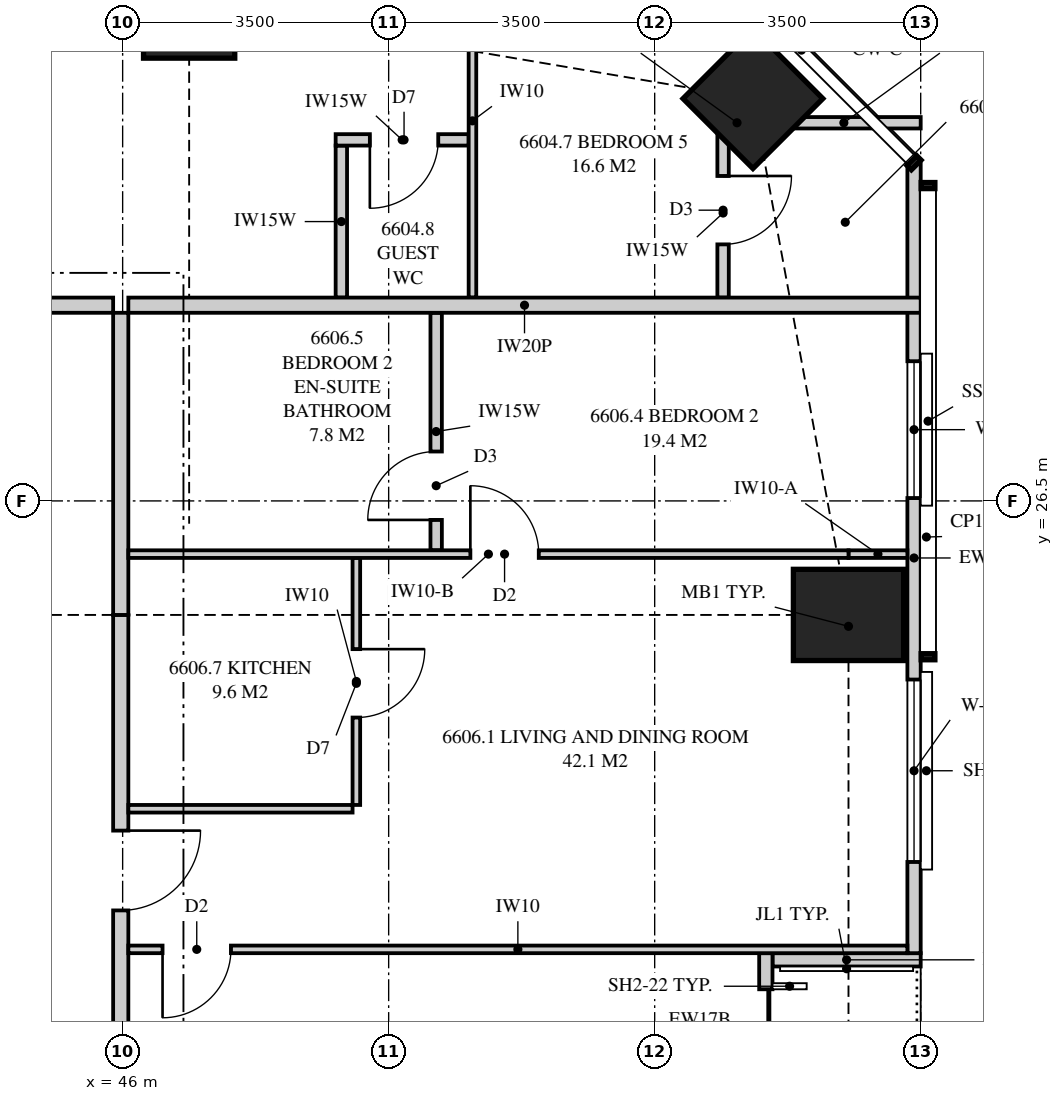
"""IFC4 building model, lengths in metres.
Left out: names, types, materials, properties, quantities, classifications, styles, units other than length and angle.
Written with IfcOpenShell. Run it as: python <this file> out.ifc"""

import sys

from ifc_helpers import new_model, si_unit, direction, frame, frame_2d, origin, origin_2d, place, context, subcontext, project, spatial, polyline, rectangle, outline, extrude, element, fill, save


model = new_model("IFC4")
c1 = context("Model", 3, precision=1e-05, world=origin(), true_north=direction((0.0, 1.0)))
c2 = subcontext(c1, "Body", "Model", "MODEL_VIEW")
j1 = project(units=[si_unit("LENGTHUNIT", "METRE"), si_unit("PLANEANGLEUNIT", "RADIAN")], contexts=[c1])
p1 = place(None, origin())
s1 = spatial("IfcSite", under=j1, at=p1, CompositionType="ELEMENT")
p2 = place(p1, origin())
s2 = spatial("IfcBuilding", under=s1, at=p2, CompositionType="ELEMENT")
p3 = place(p2, frame((0.0, 0.0, 242.45)))
s3 = spatial("IfcBuildingStorey", under=s2, at=p3, CompositionType="ELEMENT", Elevation=242.45)
p4 = place(p3, frame((55.55, 25.0, 0.0), z_axis=(0.0, 0.0, 1.0), x_axis=(1.0, 0.0, 0.0)))
e1 = element("IfcColumn", 1, at=p4, inside=s3, PredefinedType="COLUMN", context=c2, shape_type="SweptSolid", body=[
    extrude(rectangle(XDim=1.45, YDim=1.2, at=origin_2d()), origin(), (0.0, 0.0, 1.0), 3.5),
])
p5 = place(p3, frame((54.293, 31.793, 0.0), z_axis=(0.0, 0.0, 1.0), x_axis=(0.707106781187, 0.707106781187, 0.0)))
e2 = element("IfcColumn", 2, at=p5, inside=s3, PredefinedType="COLUMN", context=c2, shape_type="SweptSolid", body=[
    extrude(rectangle(XDim=1.3, YDim=1.3, at=origin_2d()), origin(), (0.0, 0.0, 1.0), 3.5),
])
p6 = place(p3, frame((46.875, 33.05, 0.0), z_axis=(0.0, 0.0, 1.0), x_axis=(0.0, 1.0, 0.0)))
e3 = element("IfcColumn", 3, at=p6, inside=s3, PredefinedType="COLUMN", context=c2, shape_type="SweptSolid", body=[
    extrude(rectangle(XDim=1.45, YDim=1.2, at=origin_2d()), origin(), (0.0, 0.0, 1.0), 3.5),
])
p7 = place(p3, frame((56.413, 20.55, 0.0), z_axis=(0.0, 0.0, 1.0), x_axis=(0.0, 1.0, 0.0)))
e4 = element("IfcWall", 4, at=p7, inside=s3, PredefinedType="SOLIDWALL", context=c2, shape_type="SweptSolid", body=[
    extrude(outline(polyline([(0.0, 0.0), (10.399, 0.0), (10.399, 3.26), (4.658, 3.26), (4.658, 2.3), (4.594, 2.3), (4.594, 3.26), (4.45, 3.26), (4.45, 2.3), (0.0, 2.3), (0.0, 0.0)])), frame((0.0, 0.087, 0.0), z_axis=(0.0, -1.0, 0.0), x_axis=(1.0, 0.0, 0.0)), (0.0, 0.0, 1.0), 0.175),
])
p8 = place(p7, frame((1.2, 0.0, 0.4)))
e5 = element("IfcOpeningElement", 5, at=p8, cuts=e4, PredefinedType="OPENING", context=c2, shape_type="SweptSolid", body=[
    extrude(rectangle(XDim=2.4, YDim=1.85, at=frame_2d((1.2, 0.925))), frame((0.0, 0.097, 0.0), z_axis=(0.0, -1.0, 0.0), x_axis=(1.0, 0.0, 0.0)), (0.0, 0.0, 1.0), 0.195),
])
p9 = place(p7, frame((5.988, 0.0, 0.4)))
e6 = element("IfcOpeningElement", 6, at=p9, cuts=e4, PredefinedType="OPENING", context=c2, shape_type="SweptSolid", body=[
    extrude(rectangle(XDim=1.8, YDim=1.85, at=frame_2d((0.9, 0.925))), frame((0.0, 0.097, 0.0), z_axis=(0.0, -1.0, 0.0), x_axis=(1.0, 0.0, 0.0)), (0.0, 0.0, 1.0), 0.195),
])
p10 = place(p3, frame((54.462, 17.8, 0.0), z_axis=(0.0, 0.0, 1.0), x_axis=(0.0, 1.0, 0.0)))
e7 = element("IfcWall", 7, at=p10, inside=s3, PredefinedType="SOLIDWALL", context=c2, shape_type="SweptSolid", body=[
    extrude(outline(polyline([(0.0, 0.0), (2.75, 0.0), (2.75, 3.26), (2.15, 3.26), (2.15, 2.66), (0.0, 2.66), (0.0, 0.0)])), frame((0.0, 0.087, 0.0), z_axis=(0.0, -1.0, 0.0), x_axis=(1.0, 0.0, 0.0)), (0.0, 0.0, 1.0), 0.175),
])
p11 = place(p10, frame((0.475, 0.0, 0.0)))
e8 = element("IfcOpeningElement", 8, at=p11, cuts=e7, PredefinedType="OPENING", context=c2, shape_type="SweptSolid", body=[
    extrude(rectangle(XDim=1.8, YDim=2.25, at=frame_2d((0.9, 1.125))), frame((0.0, 0.097, 0.0), z_axis=(0.0, -1.0, 0.0), x_axis=(1.0, 0.0, 0.0)), (0.0, 0.0, 1.0), 0.195),
])
p12 = place(p3, frame((56.5, 20.462, 0.0), z_axis=(0.0, 0.0, 1.0), x_axis=(-1.0, 0.0, 0.0)))
e9 = element("IfcWall", 9, at=p12, inside=s3, PredefinedType="SOLIDWALL", context=c2, shape_type="SweptSolid", body=[
    extrude(outline(polyline([(0.0, 0.0), (1.95, 0.0), (1.95, 3.26), (1.75, 3.26), (1.75, 2.3), (0.15, 2.3), (0.15, 3.26), (0.0, 3.26), (0.0, 0.0)])), frame((0.0, 0.087, 0.0), z_axis=(0.0, -1.0, 0.0), x_axis=(1.0, 0.0, 0.0)), (0.0, 0.0, 1.0), 0.175),
])
p13 = place(p3, frame((18.0, 29.075, 0.0), z_axis=(0.0, 0.0, 1.0), x_axis=(1.0, 0.0, 0.0)))
e10 = element("IfcWall", 10, at=p13, inside=s3, PredefinedType="PARTITIONING", context=c2, shape_type="SweptSolid", body=[
    extrude(outline(polyline([(0.0, 0.0), (27.875, 0.0), (27.875, 3.26), (27.875, 2.66), (27.565, 2.66), (27.565, 3.26), (20.56, 3.26), (20.56, 2.66), (17.94, 2.66), (17.94, 3.26), (10.935, 3.26), (10.935, 2.66), (8.315, 2.66), (8.315, 3.26), (2.192, 3.26), (2.192, 2.3), (0.256, 2.3), (0.256, 3.26), (0.0, 3.26), (0.0, 0.0)])), frame((0.0, 0.1, 0.0), z_axis=(0.0, -1.0, 0.0), x_axis=(1.0, 0.0, 0.0)), (0.0, 0.0, 1.0), 0.2),
])
p14 = place(p13, frame((18.75, 0.0, 0.0)))
e11 = element("IfcOpeningElement", 11, at=p14, cuts=e10, PredefinedType="OPENING", context=c2, shape_type="SweptSolid", body=[
    extrude(rectangle(XDim=1.05, YDim=2.2, at=frame_2d((0.525, 1.1))), frame((0.0, 0.11, 0.0), z_axis=(0.0, -1.0, 0.0), x_axis=(1.0, 0.0, 0.0)), (0.0, 0.0, 1.0), 0.22),
])
p15 = place(p3, frame((53.975, 31.475, 0.0), z_axis=(0.0, 0.0, 1.0), x_axis=(1.0, 0.0, 0.0)))
e12 = element("IfcWall", 12, at=p15, inside=s3, PredefinedType="PLUMBINGWALL", context=c2, shape_type="SweptSolid", body=[
    extrude(rectangle(XDim=0.217, YDim=0.15, at=frame_2d((0.108, 0.0))), origin(), (0.0, 0.0, 1.0), 2.3),
])
p16 = place(p3, frame((54.478, 31.475, 0.0), z_axis=(0.0, 0.0, 1.0), x_axis=(1.0, 0.0, 0.0)))
e13 = element("IfcWall", 13, at=p16, inside=s3, PredefinedType="PLUMBINGWALL", context=c2, shape_type="SweptSolid", body=[
    extrude(outline(polyline([(0.774, 3.26), (0.774, 2.3), (0.325, 2.3), (0.0, 1.15), (0.325, 0.0), (2.022, 0.0), (2.022, 3.26), (0.774, 3.26)])), frame((0.0, 0.075, 0.0), z_axis=(0.0, -1.0, 0.0), x_axis=(1.0, 0.0, 0.0)), (0.0, 0.0, 1.0), 0.15),
])
p17 = place(p3, frame((53.9, 31.4, 0.0), z_axis=(0.0, 0.0, 1.0), x_axis=(0.0, -1.0, 0.0)))
e14 = element("IfcWall", 14, at=p17, inside=s3, PredefinedType="PLUMBINGWALL", context=c2, shape_type="SweptSolid", body=[
    extrude(outline(polyline([(0.0, 0.0), (2.225, 0.0), (2.225, 3.26), (2.225, 2.3), (0.438, 2.3), (0.0, 2.3), (0.0, 3.26), (0.0, 0.0)])), frame((0.0, 0.075, 0.0), z_axis=(0.0, -1.0, 0.0), x_axis=(1.0, 0.0, 0.0)), (0.0, 0.0, 1.0), 0.15),
])
p18 = place(p17, frame((0.625, 0.0, 0.0)))
e15 = element("IfcOpeningElement", 15, at=p18, cuts=e14, PredefinedType="OPENING", context=c2, shape_type="SweptSolid", body=[
    extrude(rectangle(XDim=0.9, YDim=2.1, at=frame_2d((0.45, 1.05))), frame((0.0, 0.085, 0.0), z_axis=(0.0, -1.0, 0.0), x_axis=(1.0, 0.0, 0.0)), (0.0, 0.0, 1.0), 0.17),
])
p19 = place(p3, frame((50.603, 33.825, 0.0), z_axis=(0.0, 0.0, 1.0), x_axis=(0.0, -1.0, 0.0)))
e16 = element("IfcWall", 16, at=p19, inside=s3, PredefinedType="PARTITIONING", context=c2, shape_type="SweptSolid", body=[
    extrude(outline(polyline([(0.0, 0.0), (4.65, 0.0), (4.65, 3.26), (2.279, 3.26), (2.279, 2.3), (0.534, 2.3), (0.534, 3.26), (0.0, 3.26), (0.0, 0.0)])), frame((0.0, 0.05, 0.0), z_axis=(0.0, -1.0, 0.0), x_axis=(1.0, 0.0, 0.0)), (0.0, 0.0, 1.0), 0.1),
])
p20 = place(p19, frame((0.15, 0.0, 0.0)))
e17 = element("IfcOpeningElement", 17, at=p20, cuts=e16, PredefinedType="OPENING", context=c2, shape_type="SweptSolid", body=[
    extrude(rectangle(XDim=0.9, YDim=2.1, at=frame_2d((0.45, 1.05))), frame((0.0, 0.06, 0.0), z_axis=(0.0, -1.0, 0.0), x_axis=(1.0, 0.0, 0.0)), (0.0, 0.0, 1.0), 0.12),
])
p21 = place(p3, frame((46.075, 29.075, 0.0), z_axis=(0.0, 0.0, 1.0), x_axis=(1.0, 0.0, 0.0)))
e18 = element("IfcWall", 18, at=p21, inside=s3, PredefinedType="PARTITIONING", context=c2, shape_type="SweptSolid", body=[
    extrude(outline(polyline([(0.0, 0.0), (10.425, 0.0), (10.425, 3.26), (9.646, 3.26), (9.646, 2.3), (7.795, 2.3), (7.795, 3.26), (2.11, 3.26), (2.11, 2.66), (0.0, 2.66), (0.0, 3.26), (0.0, 0.0)])), frame((0.0, 0.1, 0.0), z_axis=(0.0, -1.0, 0.0), x_axis=(1.0, 0.0, 0.0)), (0.0, 0.0, 1.0), 0.2),
])
p22 = place(p3, frame((45.975, 14.25, 0.0), z_axis=(0.0, 0.0, 1.0), x_axis=(0.0, 1.0, 0.0)))
e19 = element("IfcWall", 19, at=p22, inside=s3, PredefinedType="PARTITIONING", context=c2, shape_type="SweptSolid", body=[
    extrude(outline(polyline([(0.0, 0.0), (10.75, 0.0), (10.75, 2.66), (9.44, 2.66), (9.44, 3.26), (5.81, 3.26), (5.81, 2.66), (3.19, 2.66), (3.19, 3.26), (0.06, 3.26), (0.06, 2.66), (0.0, 2.66), (0.0, 0.0)])), frame((0.0, 0.1, 0.0), z_axis=(0.0, -1.0, 0.0), x_axis=(1.0, 0.0, 0.0)), (0.0, 0.0, 1.0), 0.2),
])
p23 = place(p22, frame((6.863, 0.0, 0.0)))
e20 = element("IfcOpeningElement", 20, at=p23, cuts=e19, PredefinedType="OPENING", context=c2, shape_type="SweptSolid", body=[
    extrude(rectangle(XDim=1.05, YDim=2.2, at=frame_2d((0.525, 1.1))), frame((0.0, 0.11, 0.0), z_axis=(0.0, -1.0, 0.0), x_axis=(1.0, 0.0, 0.0)), (0.0, 0.0, 1.0), 0.22),
])
p24 = place(p3, frame((45.975, 25.0, 0.0), z_axis=(0.0, 0.0, 1.0), x_axis=(0.0, 1.0, 0.0)))
e21 = element("IfcWall", 21, at=p24, inside=s3, PredefinedType="PARTITIONING", context=c2, shape_type="SweptSolid", body=[
    extrude(rectangle(XDim=3.975, YDim=0.2, at=frame_2d((1.988, 0.0))), origin(), (0.0, 0.0, 1.0), 2.66),
])
p25 = place(p3, frame((56.325, 25.8, 0.0), z_axis=(0.0, 0.0, 1.0), x_axis=(-1.0, 0.0, 0.0)))
e22 = element("IfcWall", 22, at=p25, inside=s3, PredefinedType="PARTITIONING", context=c2, shape_type="SweptSolid", body=[
    extrude(outline(polyline([(0.0, 0.0), (0.775, 0.0), (0.775, 2.3), (0.048, 2.3), (0.048, 3.26), (0.0, 3.26), (0.0, 0.0)])), frame((0.0, 0.05, 0.0), z_axis=(0.0, -1.0, 0.0), x_axis=(1.0, 0.0, 0.0)), (0.0, 0.0, 1.0), 0.1),
])
p26 = place(p3, frame((55.55, 25.8, 0.0), z_axis=(0.0, 0.0, 1.0), x_axis=(-1.0, 0.0, 0.0)))
e23 = element("IfcWall", 23, at=p26, inside=s3, PredefinedType="PARTITIONING", context=c2, shape_type="SweptSolid", body=[
    extrude(outline(polyline([(0.0, 0.0), (9.475, 0.0), (9.475, 2.66), (1.023, 2.66), (1.023, 2.3), (0.0, 2.3), (0.0, 0.0)])), frame((0.0, 0.05, 0.0), z_axis=(0.0, -1.0, 0.0), x_axis=(1.0, 0.0, 0.0)), (0.0, 0.0, 1.0), 0.1),
])
p27 = place(p26, frame((4.075, 0.0, 0.0)))
e24 = element("IfcOpeningElement", 24, at=p27, cuts=e23, PredefinedType="OPENING", context=c2, shape_type="SweptSolid", body=[
    extrude(rectangle(XDim=0.9, YDim=2.1, at=frame_2d((0.45, 1.05))), frame((0.0, 0.06, 0.0), z_axis=(0.0, -1.0, 0.0), x_axis=(1.0, 0.0, 0.0)), (0.0, 0.0, 1.0), 0.12),
])
p28 = place(p3, frame((50.125, 25.85, 0.0), z_axis=(0.0, 0.0, 1.0), x_axis=(0.0, 1.0, 0.0)))
e25 = element("IfcWall", 25, at=p28, inside=s3, PredefinedType="PLUMBINGWALL", context=c2, shape_type="SweptSolid", body=[
    extrude(outline(polyline([(0.0, 0.0), (3.125, 0.0), (3.125, 3.26), (0.435, 3.26), (0.435, 2.66), (0.0, 2.66), (0.0, 3.26), (0.0, 0.0)])), frame((0.0, 0.075, 0.0), z_axis=(0.0, -1.0, 0.0), x_axis=(1.0, 0.0, 0.0)), (0.0, 0.0, 1.0), 0.15),
])
p29 = place(p28, frame((0.4, 0.0, 0.0)))
e26 = element("IfcOpeningElement", 26, at=p29, cuts=e25, PredefinedType="OPENING", context=c2, shape_type="SweptSolid", body=[
    extrude(rectangle(XDim=0.9, YDim=2.1, at=frame_2d((0.45, 1.05))), frame((0.0, 0.085, 0.0), z_axis=(0.0, -1.0, 0.0), x_axis=(1.0, 0.0, 0.0)), (0.0, 0.0, 1.0), 0.17),
])
p30 = place(p3, frame((56.325, 20.6, 0.0), z_axis=(0.0, 0.0, 1.0), x_axis=(-1.0, 0.0, 0.0)))
e27 = element("IfcWall", 27, at=p30, inside=s3, PredefinedType="PARTITIONING", context=c2, shape_type="SweptSolid", body=[
    extrude(outline(polyline([(0.0, 0.0), (10.25, 0.0), (10.25, 3.26), (1.635, 3.26), (1.635, 2.3), (0.0, 2.3), (0.0, 3.26), (0.0, 0.0)])), frame((0.0, 0.05, 0.0), z_axis=(0.0, -1.0, 0.0), x_axis=(1.0, 0.0, 0.0)), (0.0, 0.0, 1.0), 0.1),
])
p31 = place(p30, frame((8.9, 0.0, 0.0)))
e28 = element("IfcOpeningElement", 28, at=p31, cuts=e27, PredefinedType="OPENING", context=c2, shape_type="SweptSolid", body=[
    extrude(rectangle(XDim=0.9, YDim=2.1, at=frame_2d((0.45, 1.05))), frame((0.0, 0.06, 0.0), z_axis=(0.0, -1.0, 0.0), x_axis=(1.0, 0.0, 0.0)), (0.0, 0.0, 1.0), 0.12),
])
p32 = place(p3, frame((49.075, 22.5, 0.0), z_axis=(0.0, 0.0, 1.0), x_axis=(0.0, 1.0, 0.0)))
e29 = element("IfcWall", 29, at=p32, inside=s3, PredefinedType="PARTITIONING", context=c2, shape_type="SweptSolid", body=[
    extrude(outline(polyline([(0.0, 0.0), (3.25, 0.0), (3.25, 3.26), (3.25, 2.66), (1.24, 2.66), (1.24, 3.26), (0.0, 3.26), (0.0, 0.0)])), frame((0.0, 0.05, 0.0), z_axis=(0.0, -1.0, 0.0), x_axis=(1.0, 0.0, 0.0)), (0.0, 0.0, 1.0), 0.1),
])
p33 = place(p32, frame((1.15, 0.0, 0.0)))
e30 = element("IfcOpeningElement", 30, at=p33, cuts=e29, PredefinedType="OPENING", context=c2, shape_type="SweptSolid", body=[
    extrude(rectangle(XDim=0.9, YDim=2.1, at=frame_2d((0.45, 1.05))), frame((0.0, 0.06, 0.0), z_axis=(0.0, -1.0, 0.0), x_axis=(1.0, 0.0, 0.0)), (0.0, 0.0, 1.0), 0.12),
])
p34 = place(p3, frame((49.025, 22.45, 0.0), z_axis=(0.0, 0.0, 1.0), x_axis=(-1.0, 0.0, 0.0)))
e31 = element("IfcWall", 31, at=p34, inside=s3, PredefinedType="PARTITIONING", context=c2, shape_type="SweptSolid", body=[
    extrude(rectangle(XDim=2.95, YDim=0.1, at=frame_2d((1.475, 0.0))), origin(), (0.0, 0.0, 1.0), 3.26),
])
p35 = place(p3, frame((50.552, 31.25, 0.0), z_axis=(0.0, 0.0, 1.0), x_axis=(-1.0, 0.0, 0.0)))
e32 = element("IfcWall", 32, at=p35, inside=s3, PredefinedType="PLUMBINGWALL", context=c2, shape_type="SweptSolid", body=[
    extrude(rectangle(XDim=1.75, YDim=0.15, at=frame_2d((0.875, 0.0))), origin(), (0.0, 0.0, 1.0), 3.26),
])
p36 = place(p35, frame((0.4, 0.0, 0.0)))
e33 = element("IfcOpeningElement", 33, at=p36, cuts=e32, PredefinedType="OPENING", context=c2, shape_type="SweptSolid", body=[
    extrude(rectangle(XDim=0.9, YDim=2.1, at=frame_2d((0.45, 1.05))), frame((0.0, 0.085, 0.0), z_axis=(0.0, -1.0, 0.0), x_axis=(1.0, 0.0, 0.0)), (0.0, 0.0, 1.0), 0.17),
])
p37 = place(p3, frame((48.877, 29.175, 0.0), z_axis=(0.0, 0.0, 1.0), x_axis=(0.0, 1.0, 0.0)))
e34 = element("IfcWall", 34, at=p37, inside=s3, PredefinedType="PLUMBINGWALL", context=c2, shape_type="SweptSolid", body=[
    extrude(rectangle(XDim=2.0, YDim=0.15, at=frame_2d((1.0, 0.0))), origin(), (0.0, 0.0, 1.0), 3.26),
])
p38 = place(p11, origin())
e35 = element("IfcDoor", 35, at=p38, inside=s3, OperationType="SLIDING_TO_LEFT", PredefinedType="DOOR", context=c2, shape_type="SweptSolid", body=[
    extrude(rectangle(XDim=1.8, YDim=2.25, at=frame_2d((0.9, 1.125))), frame((0.0, 0.025, 0.0), z_axis=(0.0, -1.0, 0.0), x_axis=(1.0, 0.0, 0.0)), (0.0, 0.0, 1.0), 0.05),
])
fill(e8, e35)
p39 = place(p8, origin())
e36 = element("IfcWindow", 36, at=p39, inside=s3, PartitioningType="SINGLE_PANEL", PredefinedType="WINDOW", context=c2, shape_type="SweptSolid", body=[
    extrude(rectangle(XDim=2.4, YDim=1.85, at=frame_2d((1.2, 0.925))), frame((0.0, 0.03, 0.0), z_axis=(0.0, -1.0, 0.0), x_axis=(1.0, 0.0, 0.0)), (0.0, 0.0, 1.0), 0.06),
])
fill(e5, e36)
p40 = place(p9, origin())
e37 = element("IfcWindow", 37, at=p40, inside=s3, PartitioningType="SINGLE_PANEL", PredefinedType="WINDOW", context=c2, shape_type="SweptSolid", body=[
    extrude(rectangle(XDim=1.8, YDim=1.85, at=frame_2d((0.9, 0.925))), frame((0.0, 0.03, 0.0), z_axis=(0.0, -1.0, 0.0), x_axis=(1.0, 0.0, 0.0)), (0.0, 0.0, 1.0), 0.06),
])
fill(e6, e37)
p41 = place(p18, origin())
e38 = element("IfcDoor", 38, at=p41, inside=s3, OperationType="SINGLE_SWING_LEFT", PredefinedType="DOOR", context=c2, shape_type="SweptSolid", body=[
    extrude(rectangle(XDim=0.9, YDim=2.1, at=frame_2d((0.45, 1.05))), frame((0.0, 0.025, 0.0), z_axis=(0.0, -1.0, 0.0), x_axis=(1.0, 0.0, 0.0)), (0.0, 0.0, 1.0), 0.05),
])
fill(e15, e38)
p42 = place(p23, frame((1.05, 0.0, 0.0), z_axis=(0.0, 0.0, 1.0), x_axis=(-1.0, 0.0, 0.0)))
e39 = element("IfcDoor", 39, at=p42, inside=s3, OperationType="SINGLE_SWING_LEFT", PredefinedType="DOOR", context=c2, shape_type="SweptSolid", body=[
    extrude(rectangle(XDim=1.05, YDim=2.2, at=frame_2d((0.525, 1.1))), frame((0.0, 0.025, 0.0), z_axis=(0.0, -1.0, 0.0), x_axis=(1.0, 0.0, 0.0)), (0.0, 0.0, 1.0), 0.05),
])
fill(e20, e39)
p43 = place(p27, frame((0.9, 0.0, 0.0), z_axis=(0.0, 0.0, 1.0), x_axis=(-1.0, 0.0, 0.0)))
e40 = element("IfcDoor", 40, at=p43, inside=s3, OperationType="SINGLE_SWING_LEFT", PredefinedType="DOOR", context=c2, shape_type="SweptSolid", body=[
    extrude(rectangle(XDim=0.9, YDim=2.1, at=frame_2d((0.45, 1.05))), frame((0.0, 0.025, 0.0), z_axis=(0.0, -1.0, 0.0), x_axis=(1.0, 0.0, 0.0)), (0.0, 0.0, 1.0), 0.05),
])
fill(e24, e40)
p44 = place(p29, origin())
e41 = element("IfcDoor", 41, at=p44, inside=s3, OperationType="SINGLE_SWING_LEFT", PredefinedType="DOOR", context=c2, shape_type="SweptSolid", body=[
    extrude(rectangle(XDim=0.9, YDim=2.1, at=frame_2d((0.45, 1.05))), frame((0.0, 0.025, 0.0), z_axis=(0.0, -1.0, 0.0), x_axis=(1.0, 0.0, 0.0)), (0.0, 0.0, 1.0), 0.05),
])
fill(e26, e41)
p45 = place(p31, origin())
e42 = element("IfcDoor", 42, at=p45, inside=s3, OperationType="SINGLE_SWING_RIGHT", PredefinedType="DOOR", context=c2, shape_type="SweptSolid", body=[
    extrude(rectangle(XDim=0.9, YDim=2.1, at=frame_2d((0.45, 1.05))), frame((0.0, 0.025, 0.0), z_axis=(0.0, -1.0, 0.0), x_axis=(1.0, 0.0, 0.0)), (0.0, 0.0, 1.0), 0.05),
])
fill(e28, e42)
p46 = place(p33, frame((0.9, 0.0, 0.0), z_axis=(0.0, 0.0, 1.0), x_axis=(-1.0, 0.0, 0.0)))
e43 = element("IfcDoor", 43, at=p46, inside=s3, OperationType="SINGLE_SWING_LEFT", PredefinedType="DOOR", context=c2, shape_type="SweptSolid", body=[
    extrude(rectangle(XDim=0.9, YDim=2.1, at=frame_2d((0.45, 1.05))), frame((0.0, 0.025, 0.0), z_axis=(0.0, -1.0, 0.0), x_axis=(1.0, 0.0, 0.0)), (0.0, 0.0, 1.0), 0.05),
])
fill(e30, e43)
p47 = place(p36, origin())
e44 = element("IfcDoor", 44, at=p47, inside=s3, OperationType="SINGLE_SWING_RIGHT", PredefinedType="DOOR", context=c2, shape_type="SweptSolid", body=[
    extrude(rectangle(XDim=0.9, YDim=2.1, at=frame_2d((0.45, 1.05))), frame((0.0, 0.025, 0.0), z_axis=(0.0, -1.0, 0.0), x_axis=(1.0, 0.0, 0.0)), (0.0, 0.0, 1.0), 0.05),
])
fill(e33, e44)
save(model, sys.argv[1])
